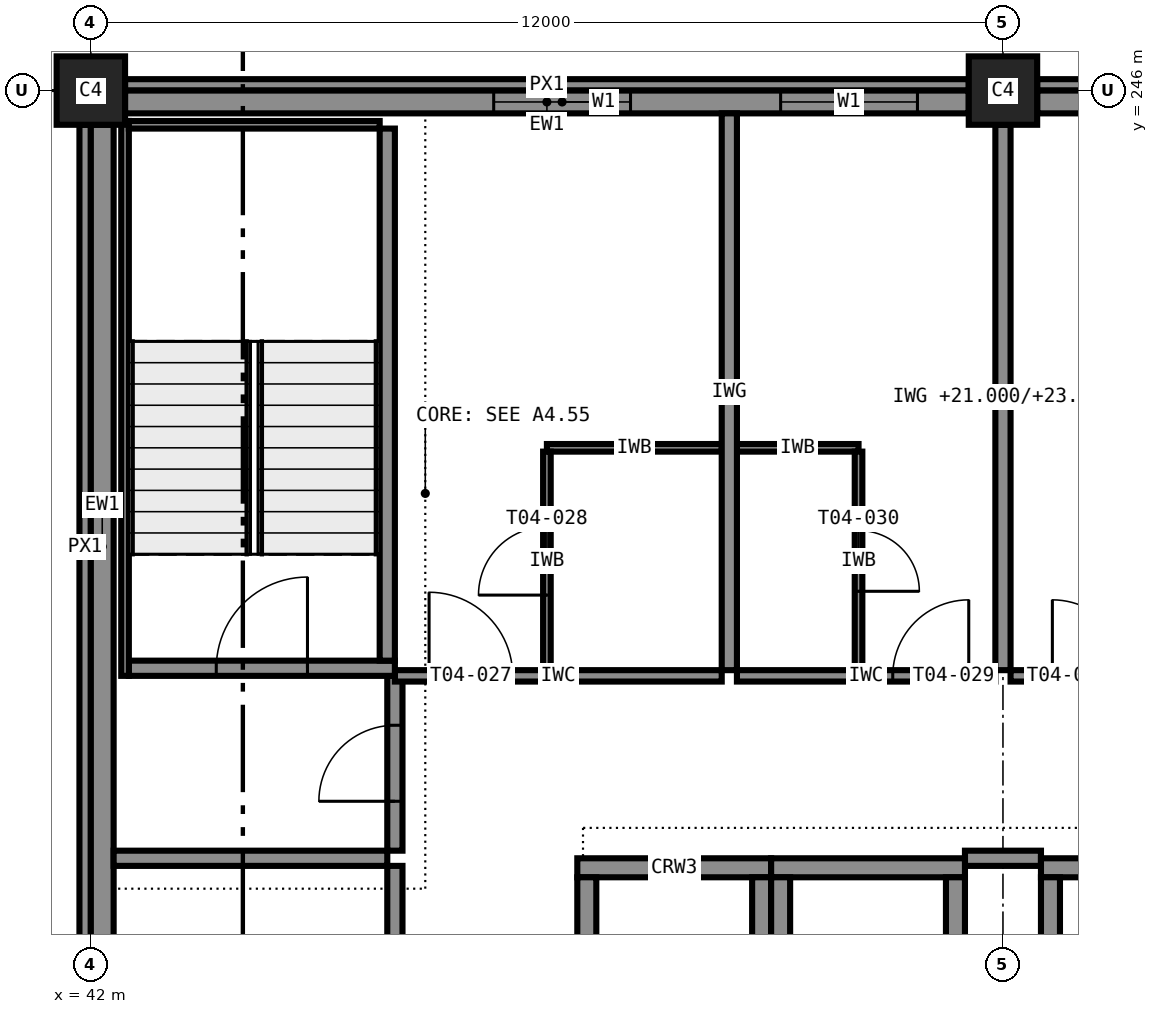
"""IFC4 building model, lengths in metres.
Left out: names, types, materials, properties, quantities, classifications, styles, units other than length and angle.
Written with IfcOpenShell. Run it as: python <this file> out.ifc"""

import sys

from ifc_helpers import new_model, si_unit, direction, frame, frame_2d, origin, origin_2d, place, context, subcontext, project, spatial, rectangle, extrude, element, fill, save


model = new_model("IFC4")
c1 = context("Model", 3, precision=1e-05, world=origin(), true_north=direction((0.0, 1.0)))
c2 = subcontext(c1, "Body", "Model", "MODEL_VIEW")
j1 = project(units=[si_unit("LENGTHUNIT", "METRE"), si_unit("PLANEANGLEUNIT", "RADIAN")], contexts=[c1])
p1 = place(None, origin())
s1 = spatial("IfcSite", under=j1, at=p1, CompositionType="ELEMENT")
p2 = place(p1, origin())
s2 = spatial("IfcBuilding", under=s1, at=p2, CompositionType="ELEMENT")
p3 = place(p2, frame((0.0, 0.0, 21.0)))
s3 = spatial("IfcBuildingStorey", under=s2, at=p3, CompositionType="ELEMENT", Elevation=21.0)
for number, where, z_axis, x_axis in (
    (1, (42.0, 246.0, 0.0), (0.0, 0.0, 1.0), (1.0, 0.0, 0.0)),
    (2, (54.0, 246.0, 0.0), (0.0, 0.0, 1.0), (1.0, 0.0, 0.0)),
):
    element("IfcColumn", number, at=place(p3, frame(where, z_axis=z_axis, x_axis=x_axis)), inside=s3, PredefinedType="COLUMN", context=c2, shape_type="SweptSolid", body=[
        extrude(rectangle(XDim=0.9, YDim=0.9, at=origin_2d()), origin(), (0.0, 0.0, 1.0), 3.6),
    ])
p4 = place(p3, frame((54.5, 235.775, 0.0), z_axis=(0.0, 0.0, 1.0), x_axis=(1.0, 0.0, 0.0)))
e3 = element("IfcWall", 3, at=p4, inside=s3, PredefinedType="SHEAR", context=c2, shape_type="SweptSolid", body=[
    extrude(rectangle(XDim=3.0, YDim=0.25, at=frame_2d((1.5, 0.0))), origin(), (0.0, 0.0, 1.0), 3.6),
])
p5 = place(p3, frame((54.625, 232.35, 0.0), z_axis=(0.0, 0.0, 1.0), x_axis=(0.0, 1.0, 0.0)))
e4 = element("IfcWall", 4, at=p5, inside=s3, PredefinedType="SHEAR", context=c2, shape_type="SweptSolid", body=[
    extrude(rectangle(XDim=3.3, YDim=0.25, at=frame_2d((1.65, 0.0))), origin(), (0.0, 0.0, 1.0), 3.6),
])
p6 = place(p3, frame((48.4, 235.775, 0.0), z_axis=(0.0, 0.0, 1.0), x_axis=(1.0, 0.0, 0.0)))
e5 = element("IfcWall", 5, at=p6, inside=s3, PredefinedType="SHEAR", context=c2, shape_type="SweptSolid", body=[
    extrude(rectangle(XDim=2.55, YDim=0.25, at=frame_2d((1.275, 0.0))), origin(), (0.0, 0.0, 1.0), 3.6),
])
for number, where, z_axis, x_axis in (
    (6, (48.525, 232.35, 0.0), (0.0, 0.0, 1.0), (0.0, 1.0, 0.0)),
    (7, (50.825, 232.35, 0.0), (0.0, 0.0, 1.0), (0.0, 1.0, 0.0)),
):
    element("IfcWall", number, at=place(p3, frame(where, z_axis=z_axis, x_axis=x_axis)), inside=s3, PredefinedType="SHEAR", context=c2, shape_type="SweptSolid", body=[
        extrude(rectangle(XDim=3.3, YDim=0.25, at=frame_2d((1.65, 0.0))), origin(), (0.0, 0.0, 1.0), 3.6),
    ])
p7 = place(p3, frame((50.95, 235.775, 0.0), z_axis=(0.0, 0.0, 1.0), x_axis=(1.0, 0.0, 0.0)))
e8 = element("IfcWall", 8, at=p7, inside=s3, PredefinedType="SHEAR", context=c2, shape_type="SweptSolid", body=[
    extrude(rectangle(XDim=2.55, YDim=0.25, at=frame_2d((1.275, 0.0))), origin(), (0.0, 0.0, 1.0), 3.6),
])
for number, where, z_axis, x_axis in (
    (9, (51.075, 232.35, 0.0), (0.0, 0.0, 1.0), (0.0, 1.0, 0.0)),
    (10, (53.375, 232.35, 0.0), (0.0, 0.0, 1.0), (0.0, 1.0, 0.0)),
):
    element("IfcWall", number, at=place(p3, frame(where, z_axis=z_axis, x_axis=x_axis)), inside=s3, PredefinedType="SHEAR", context=c2, shape_type="SweptSolid", body=[
        extrude(rectangle(XDim=3.3, YDim=0.25, at=frame_2d((1.65, 0.0))), origin(), (0.0, 0.0, 1.0), 3.6),
    ])
p8 = place(p3, frame((42.5, 238.4, 0.0), z_axis=(0.0, 0.0, 1.0), x_axis=(1.0, 0.0, 0.0)))
e11 = element("IfcWall", 11, at=p8, inside=s3, PredefinedType="SHEAR", context=c2, shape_type="SweptSolid", body=[
    extrude(rectangle(XDim=3.5, YDim=0.2, at=frame_2d((1.75, 0.0))), origin(), (0.0, 0.0, 1.0), 3.6),
])
p9 = place(p8, frame((1.15, 0.0, 0.0)))
e12 = element("IfcOpeningElement", 12, at=p9, cuts=e11, PredefinedType="OPENING", context=c2, shape_type="SweptSolid", body=[
    extrude(rectangle(XDim=1.2, YDim=2.1, at=frame_2d((0.6, 1.05))), frame((0.0, 0.11, 0.0), z_axis=(0.0, -1.0, 0.0), x_axis=(1.0, 0.0, 0.0)), (0.0, 0.0, 1.0), 0.22),
])
p10 = place(p3, frame((45.9, 238.5, 0.0), z_axis=(0.0, 0.0, 1.0), x_axis=(0.0, 1.0, 0.0)))
e13 = element("IfcWall", 13, at=p10, inside=s3, PredefinedType="SHEAR", context=c2, shape_type="SweptSolid", body=[
    extrude(rectangle(XDim=7.0, YDim=0.2, at=frame_2d((3.5, 0.0))), origin(), (0.0, 0.0, 1.0), 3.6),
])
p11 = place(p3, frame((42.45, 238.3, 0.0), z_axis=(0.0, 0.0, 1.0), x_axis=(0.0, 1.0, 0.0)))
e14 = element("IfcWall", 14, at=p11, inside=s3, PredefinedType="SHEAR", context=c2, shape_type="SweptSolid", body=[
    extrude(rectangle(XDim=7.3, YDim=0.1, at=frame_2d((3.65, 0.0))), origin(), (0.0, 0.0, 1.0), 3.4),
])
p12 = place(p3, frame((42.5, 245.55, 0.0), z_axis=(0.0, 0.0, 1.0), x_axis=(1.0, 0.0, 0.0)))
e15 = element("IfcWall", 15, at=p12, inside=s3, PredefinedType="SHEAR", context=c2, shape_type="SweptSolid", body=[
    extrude(rectangle(XDim=3.3, YDim=0.1, at=frame_2d((1.65, 0.0))), origin(), (0.0, 0.0, 1.0), 3.4),
])
p13 = place(p3, frame((65.55, 245.85, 0.0), z_axis=(0.0, 0.0, 1.0), x_axis=(-1.0, 0.0, 0.0)))
e16 = element("IfcWall", 16, at=p13, inside=s3, PredefinedType="STANDARD", context=c2, shape_type="SweptSolid", body=[
    extrude(rectangle(XDim=11.1, YDim=0.3, at=frame_2d((5.55, 0.0))), origin(), (0.0, 0.0, 1.0), 2.6),
])
p14 = place(p13, frame((8.425, 0.0, 0.85)))
e17 = element("IfcOpeningElement", 17, at=p14, cuts=e16, PredefinedType="OPENING", context=c2, shape_type="SweptSolid", body=[
    extrude(rectangle(XDim=1.8, YDim=1.75, at=frame_2d((0.9, 0.875))), frame((0.0, 0.16, 0.0), z_axis=(0.0, -1.0, 0.0), x_axis=(1.0, 0.0, 0.0)), (0.0, 0.0, 1.0), 0.32),
])
p15 = place(p13, frame((4.65, 0.0, 0.85)))
e18 = element("IfcOpeningElement", 18, at=p15, cuts=e16, PredefinedType="OPENING", context=c2, shape_type="SweptSolid", body=[
    extrude(rectangle(XDim=1.8, YDim=1.75, at=frame_2d((0.9, 0.875))), frame((0.0, 0.16, 0.0), z_axis=(0.0, -1.0, 0.0), x_axis=(1.0, 0.0, 0.0)), (0.0, 0.0, 1.0), 0.32),
])
p16 = place(p13, frame((0.875, 0.0, 0.85)))
e19 = element("IfcOpeningElement", 19, at=p16, cuts=e16, PredefinedType="OPENING", context=c2, shape_type="SweptSolid", body=[
    extrude(rectangle(XDim=1.8, YDim=1.75, at=frame_2d((0.9, 0.875))), frame((0.0, 0.16, 0.0), z_axis=(0.0, -1.0, 0.0), x_axis=(1.0, 0.0, 0.0)), (0.0, 0.0, 1.0), 0.32),
])
p17 = place(p3, frame((53.55, 245.85, 0.0), z_axis=(0.0, 0.0, 1.0), x_axis=(-1.0, 0.0, 0.0)))
e20 = element("IfcWall", 20, at=p17, inside=s3, PredefinedType="STANDARD", context=c2, shape_type="SweptSolid", body=[
    extrude(rectangle(XDim=11.1, YDim=0.3, at=frame_2d((5.55, 0.0))), origin(), (0.0, 0.0, 1.0), 2.6),
])
p18 = place(p17, frame((4.45, 0.0, 0.85)))
e21 = element("IfcOpeningElement", 21, at=p18, cuts=e20, PredefinedType="OPENING", context=c2, shape_type="SweptSolid", body=[
    extrude(rectangle(XDim=1.8, YDim=1.75, at=frame_2d((0.9, 0.875))), frame((0.0, 0.16, 0.0), z_axis=(0.0, -1.0, 0.0), x_axis=(1.0, 0.0, 0.0)), (0.0, 0.0, 1.0), 0.32),
])
p19 = place(p17, frame((0.675, 0.0, 0.85)))
e22 = element("IfcOpeningElement", 22, at=p19, cuts=e20, PredefinedType="OPENING", context=c2, shape_type="SweptSolid", body=[
    extrude(rectangle(XDim=1.8, YDim=1.75, at=frame_2d((0.9, 0.875))), frame((0.0, 0.16, 0.0), z_axis=(0.0, -1.0, 0.0), x_axis=(1.0, 0.0, 0.0)), (0.0, 0.0, 1.0), 0.32),
])
for number, where, z_axis, x_axis in (
    (23, (65.55, 246.075, 3.4), (0.0, 0.0, 1.0), (-1.0, 0.0, 0.0)),
    (24, (53.55, 246.075, 3.4), (0.0, 0.0, 1.0), (-1.0, 0.0, 0.0)),
):
    element("IfcWall", number, at=place(p3, frame(where, z_axis=z_axis, x_axis=x_axis)), inside=s3, PredefinedType="STANDARD", context=c2, shape_type="SweptSolid", body=[
        extrude(rectangle(XDim=11.1, YDim=0.15, at=frame_2d((5.55, 0.0))), origin(), (0.0, 0.0, 1.0), 0.2),
    ])
p20 = place(p3, frame((42.15, 245.55, 0.0), z_axis=(0.0, 0.0, 1.0), x_axis=(0.0, -1.0, 0.0)))
e25 = element("IfcWall", 25, at=p20, inside=s3, PredefinedType="STANDARD", context=c2, shape_type="SweptSolid", body=[
    extrude(rectangle(XDim=11.1, YDim=0.3, at=frame_2d((5.55, 0.0))), origin(), (0.0, 0.0, 1.0), 2.6),
])
p21 = place(p3, frame((41.925, 245.55, 3.4), z_axis=(0.0, 0.0, 1.0), x_axis=(0.0, -1.0, 0.0)))
e26 = element("IfcWall", 26, at=p21, inside=s3, PredefinedType="STANDARD", context=c2, shape_type="SweptSolid", body=[
    extrude(rectangle(XDim=11.1, YDim=0.15, at=frame_2d((5.55, 0.0))), origin(), (0.0, 0.0, 1.0), 0.2),
])
p22 = place(p3, frame((42.3, 235.9, 0.0), z_axis=(0.0, 0.0, 1.0), x_axis=(1.0, 0.0, 0.0)))
e27 = element("IfcWall", 27, at=p22, inside=s3, PredefinedType="PARTITIONING", context=c2, shape_type="SweptSolid", body=[
    extrude(rectangle(XDim=3.6, YDim=0.2, at=frame_2d((1.8, 0.0))), origin(), (0.0, 0.0, 1.0), 3.4),
])
p23 = place(p3, frame((53.5, 235.9, 0.0), z_axis=(0.0, 0.0, 1.0), x_axis=(1.0, 0.0, 0.0)))
e28 = element("IfcWall", 28, at=p23, inside=s3, PredefinedType="PARTITIONING", context=c2, shape_type="SweptSolid", body=[
    extrude(rectangle(XDim=1.0, YDim=0.2, at=frame_2d((0.5, 0.0))), origin(), (0.0, 0.0, 1.0), 3.4),
])
p24 = place(p3, frame((46.0, 232.2, 0.0), z_axis=(0.0, 0.0, 1.0), x_axis=(0.0, 1.0, 0.0)))
e29 = element("IfcWall", 29, at=p24, inside=s3, PredefinedType="PARTITIONING", context=c2, shape_type="SweptSolid", body=[
    extrude(rectangle(XDim=3.6, YDim=0.2, at=frame_2d((1.8, 0.0))), origin(), (0.0, 0.0, 1.0), 3.4),
])
p25 = place(p24, frame((1.35, 0.0, 0.0)))
e30 = element("IfcOpeningElement", 30, at=p25, cuts=e29, PredefinedType="OPENING", context=c2, shape_type="SweptSolid", body=[
    extrude(rectangle(XDim=0.9, YDim=2.1, at=frame_2d((0.45, 1.05))), frame((0.0, 0.11, 0.0), z_axis=(0.0, -1.0, 0.0), x_axis=(1.0, 0.0, 0.0)), (0.0, 0.0, 1.0), 0.22),
])
p26 = place(p3, frame((46.0, 236.0, 0.0), z_axis=(0.0, 0.0, 1.0), x_axis=(0.0, 1.0, 0.0)))
e31 = element("IfcWall", 31, at=p26, inside=s3, PredefinedType="PARTITIONING", context=c2, shape_type="SweptSolid", body=[
    extrude(rectangle(XDim=2.3, YDim=0.2, at=frame_2d((1.15, 0.0))), origin(), (0.0, 0.0, 1.0), 3.4),
])
p27 = place(p26, frame((0.65, 0.0, 0.0)))
e32 = element("IfcOpeningElement", 32, at=p27, cuts=e31, PredefinedType="OPENING", context=c2, shape_type="SweptSolid", body=[
    extrude(rectangle(XDim=1.0, YDim=2.1, at=frame_2d((0.5, 1.05))), frame((0.0, 0.11, 0.0), z_axis=(0.0, -1.0, 0.0), x_axis=(1.0, 0.0, 0.0)), (0.0, 0.0, 1.0), 0.22),
])
p28 = place(p3, frame((46.0, 238.3, 0.0), z_axis=(0.0, 0.0, 1.0), x_axis=(1.0, 0.0, 0.0)))
e33 = element("IfcWall", 33, at=p28, inside=s3, PredefinedType="PARTITIONING", context=c2, shape_type="SweptSolid", body=[
    extrude(rectangle(XDim=4.3, YDim=0.15, at=frame_2d((2.15, 0.0))), origin(), (0.0, 0.0, 1.0), 3.4),
])
p29 = place(p28, frame((0.45, 0.0, 0.0)))
e34 = element("IfcOpeningElement", 34, at=p29, cuts=e33, PredefinedType="OPENING", context=c2, shape_type="SweptSolid", body=[
    extrude(rectangle(XDim=1.1, YDim=2.1, at=frame_2d((0.55, 1.05))), frame((0.0, 0.085, 0.0), z_axis=(0.0, -1.0, 0.0), x_axis=(1.0, 0.0, 0.0)), (0.0, 0.0, 1.0), 0.17),
])
p30 = place(p3, frame((48.0, 241.3, 0.0), z_axis=(0.0, 0.0, 1.0), x_axis=(1.0, 0.0, 0.0)))
e35 = element("IfcWall", 35, at=p30, inside=s3, PredefinedType="PARTITIONING", context=c2, shape_type="SweptSolid", body=[
    extrude(rectangle(XDim=2.3, YDim=0.1, at=frame_2d((1.15, 0.0))), origin(), (0.0, 0.0, 1.0), 3.4),
])
p31 = place(p3, frame((48.0, 238.375, 0.0), z_axis=(0.0, 0.0, 1.0), x_axis=(0.0, 1.0, 0.0)))
e36 = element("IfcWall", 36, at=p31, inside=s3, PredefinedType="PARTITIONING", context=c2, shape_type="SweptSolid", body=[
    extrude(rectangle(XDim=2.875, YDim=0.1, at=frame_2d((1.438, 0.0))), origin(), (0.0, 0.0, 1.0), 3.4),
])
p32 = place(p31, frame((0.988, 0.0, 0.0)))
e37 = element("IfcOpeningElement", 37, at=p32, cuts=e36, PredefinedType="OPENING", context=c2, shape_type="SweptSolid", body=[
    extrude(rectangle(XDim=0.9, YDim=2.1, at=frame_2d((0.45, 1.05))), frame((0.0, 0.06, 0.0), z_axis=(0.0, -1.0, 0.0), x_axis=(1.0, 0.0, 0.0)), (0.0, 0.0, 1.0), 0.12),
])
p33 = place(p3, frame((50.5, 238.3, 0.0), z_axis=(0.0, 0.0, 1.0), x_axis=(1.0, 0.0, 0.0)))
e38 = element("IfcWall", 38, at=p33, inside=s3, PredefinedType="PARTITIONING", context=c2, shape_type="SweptSolid", body=[
    extrude(rectangle(XDim=3.4, YDim=0.15, at=frame_2d((1.7, 0.0))), origin(), (0.0, 0.0, 1.0), 3.4),
])
p34 = place(p33, frame((2.05, 0.0, 0.0)))
e39 = element("IfcOpeningElement", 39, at=p34, cuts=e38, PredefinedType="OPENING", context=c2, shape_type="SweptSolid", body=[
    extrude(rectangle(XDim=1.0, YDim=2.1, at=frame_2d((0.5, 1.05))), frame((0.0, 0.085, 0.0), z_axis=(0.0, -1.0, 0.0), x_axis=(1.0, 0.0, 0.0)), (0.0, 0.0, 1.0), 0.17),
])
p35 = place(p3, frame((50.5, 241.3, 0.0), z_axis=(0.0, 0.0, 1.0), x_axis=(1.0, 0.0, 0.0)))
e40 = element("IfcWall", 40, at=p35, inside=s3, PredefinedType="PARTITIONING", context=c2, shape_type="SweptSolid", body=[
    extrude(rectangle(XDim=1.6, YDim=0.1, at=frame_2d((0.8, 0.0))), origin(), (0.0, 0.0, 1.0), 3.4),
])
p36 = place(p3, frame((52.1, 241.25, 0.0), z_axis=(0.0, 0.0, 1.0), x_axis=(0.0, -1.0, 0.0)))
e41 = element("IfcWall", 41, at=p36, inside=s3, PredefinedType="PARTITIONING", context=c2, shape_type="SweptSolid", body=[
    extrude(rectangle(XDim=2.875, YDim=0.1, at=frame_2d((1.438, 0.0))), origin(), (0.0, 0.0, 1.0), 3.4),
])
p37 = place(p36, frame((1.038, 0.0, 0.0)))
e42 = element("IfcOpeningElement", 42, at=p37, cuts=e41, PredefinedType="OPENING", context=c2, shape_type="SweptSolid", body=[
    extrude(rectangle(XDim=0.8, YDim=2.1, at=frame_2d((0.4, 1.05))), frame((0.0, 0.06, 0.0), z_axis=(0.0, -1.0, 0.0), x_axis=(1.0, 0.0, 0.0)), (0.0, 0.0, 1.0), 0.12),
])
p38 = place(p3, frame((54.1, 238.3, 0.0), z_axis=(0.0, 0.0, 1.0), x_axis=(1.0, 0.0, 0.0)))
e43 = element("IfcWall", 43, at=p38, inside=s3, PredefinedType="PARTITIONING", context=c2, shape_type="SweptSolid", body=[
    extrude(rectangle(XDim=3.8, YDim=0.15, at=frame_2d((1.9, 0.0))), origin(), (0.0, 0.0, 1.0), 3.4),
])
p39 = place(p38, frame((0.55, 0.0, 0.0)))
e44 = element("IfcOpeningElement", 44, at=p39, cuts=e43, PredefinedType="OPENING", context=c2, shape_type="SweptSolid", body=[
    extrude(rectangle(XDim=1.0, YDim=2.1, at=frame_2d((0.5, 1.05))), frame((0.0, 0.085, 0.0), z_axis=(0.0, -1.0, 0.0), x_axis=(1.0, 0.0, 0.0)), (0.0, 0.0, 1.0), 0.17),
])
p40 = place(p3, frame((50.4, 245.7, 0.0), z_axis=(0.0, 0.0, 1.0), x_axis=(0.0, -1.0, 0.0)))
e45 = element("IfcWall", 45, at=p40, inside=s3, PredefinedType="PARTITIONING", context=c2, shape_type="SweptSolid", body=[
    extrude(rectangle(XDim=7.325, YDim=0.2, at=frame_2d((3.663, 0.0))), origin(), (0.0, 0.0, 1.0), 3.4),
])
p41 = place(p3, frame((54.0, 245.55, 0.0), z_axis=(0.0, 0.0, 1.0), x_axis=(0.0, -1.0, 0.0)))
e46 = element("IfcWall", 46, at=p41, inside=s3, PredefinedType="PARTITIONING", context=c2, shape_type="SweptSolid", body=[
    extrude(rectangle(XDim=7.175, YDim=0.2, at=frame_2d((3.587, 0.0))), origin(), (0.0, 0.0, 1.0), 2.6),
])
p42 = place(p18, origin())
e47 = element("IfcWindow", 47, at=p42, inside=s3, PartitioningType="SINGLE_PANEL", PredefinedType="WINDOW", context=c2, shape_type="SweptSolid", body=[
    extrude(rectangle(XDim=1.8, YDim=1.75, at=frame_2d((0.9, 0.875))), frame((0.0, 0.03, 0.0), z_axis=(0.0, -1.0, 0.0), x_axis=(1.0, 0.0, 0.0)), (0.0, 0.0, 1.0), 0.06),
])
fill(e21, e47)
p43 = place(p19, origin())
e48 = element("IfcWindow", 48, at=p43, inside=s3, PartitioningType="SINGLE_PANEL", PredefinedType="WINDOW", context=c2, shape_type="SweptSolid", body=[
    extrude(rectangle(XDim=1.8, YDim=1.75, at=frame_2d((0.9, 0.875))), frame((0.0, 0.03, 0.0), z_axis=(0.0, -1.0, 0.0), x_axis=(1.0, 0.0, 0.0)), (0.0, 0.0, 1.0), 0.06),
])
fill(e22, e48)
p44 = place(p27, origin())
e49 = element("IfcDoor", 49, at=p44, inside=s3, OperationType="SINGLE_SWING_LEFT", PredefinedType="DOOR", context=c2, shape_type="SweptSolid", body=[
    extrude(rectangle(XDim=1.0, YDim=2.1, at=frame_2d((0.5, 1.05))), frame((0.0, 0.025, 0.0), z_axis=(0.0, -1.0, 0.0), x_axis=(1.0, 0.0, 0.0)), (0.0, 0.0, 1.0), 0.05),
])
fill(e32, e49)
p45 = place(p29, origin())
e50 = element("IfcDoor", 50, at=p45, inside=s3, OperationType="SINGLE_SWING_LEFT", PredefinedType="DOOR", context=c2, shape_type="SweptSolid", body=[
    extrude(rectangle(XDim=1.1, YDim=2.1, at=frame_2d((0.55, 1.05))), frame((0.0, 0.025, 0.0), z_axis=(0.0, -1.0, 0.0), x_axis=(1.0, 0.0, 0.0)), (0.0, 0.0, 1.0), 0.05),
])
fill(e34, e50)
p46 = place(p32, origin())
e51 = element("IfcDoor", 51, at=p46, inside=s3, OperationType="SINGLE_SWING_LEFT", PredefinedType="DOOR", context=c2, shape_type="SweptSolid", body=[
    extrude(rectangle(XDim=0.9, YDim=2.1, at=frame_2d((0.45, 1.05))), frame((0.0, 0.025, 0.0), z_axis=(0.0, -1.0, 0.0), x_axis=(1.0, 0.0, 0.0)), (0.0, 0.0, 1.0), 0.05),
])
fill(e37, e51)
p47 = place(p34, origin())
e52 = element("IfcDoor", 52, at=p47, inside=s3, OperationType="SINGLE_SWING_RIGHT", PredefinedType="DOOR", context=c2, shape_type="SweptSolid", body=[
    extrude(rectangle(XDim=1.0, YDim=2.1, at=frame_2d((0.5, 1.05))), frame((0.0, 0.025, 0.0), z_axis=(0.0, -1.0, 0.0), x_axis=(1.0, 0.0, 0.0)), (0.0, 0.0, 1.0), 0.05),
])
fill(e39, e52)
p48 = place(p37, origin())
e53 = element("IfcDoor", 53, at=p48, inside=s3, OperationType="SINGLE_SWING_RIGHT", PredefinedType="DOOR", context=c2, shape_type="SweptSolid", body=[
    extrude(rectangle(XDim=0.8, YDim=2.1, at=frame_2d((0.4, 1.05))), frame((0.0, 0.025, 0.0), z_axis=(0.0, -1.0, 0.0), x_axis=(1.0, 0.0, 0.0)), (0.0, 0.0, 1.0), 0.05),
])
fill(e42, e53)
p49 = place(p39, origin())
e54 = element("IfcDoor", 54, at=p49, inside=s3, OperationType="SINGLE_SWING_LEFT", PredefinedType="DOOR", context=c2, shape_type="SweptSolid", body=[
    extrude(rectangle(XDim=1.0, YDim=2.1, at=frame_2d((0.5, 1.05))), frame((0.0, 0.025, 0.0), z_axis=(0.0, -1.0, 0.0), x_axis=(1.0, 0.0, 0.0)), (0.0, 0.0, 1.0), 0.05),
])
fill(e44, e54)
p50 = place(p9, origin())
e55 = element("IfcDoor", 55, at=p50, inside=s3, OperationType="SINGLE_SWING_RIGHT", PredefinedType="DOOR", context=c2, shape_type="SweptSolid", body=[
    extrude(rectangle(XDim=1.2, YDim=2.1, at=frame_2d((0.6, 1.05))), frame((0.0, 0.025, 0.0), z_axis=(0.0, -1.0, 0.0), x_axis=(1.0, 0.0, 0.0)), (0.0, 0.0, 1.0), 0.05),
])
fill(e12, e55)
save(model, sys.argv[1])
